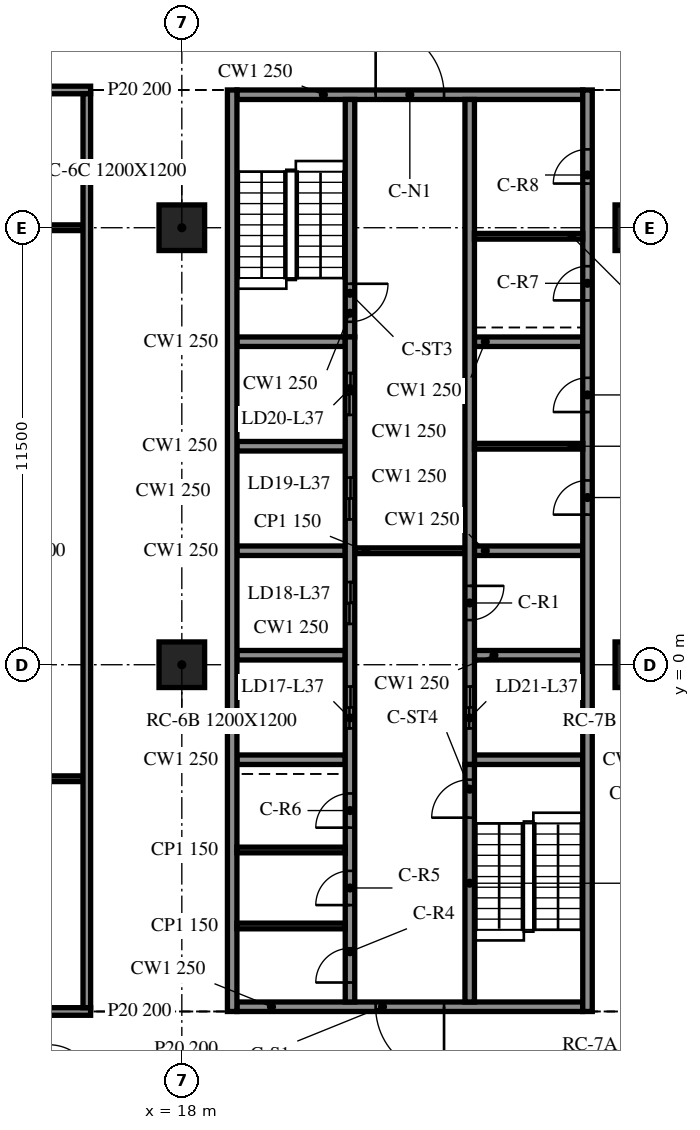
"""IFC4 building model, lengths in metres.
Left out: names, types, materials, properties, quantities, classifications, styles, units other than length and angle.
Written with IfcOpenShell. Run it as: python <this file> out.ifc"""

import sys

from ifc_helpers import new_model, si_unit, direction, frame, frame_2d, origin, origin_2d, place, context, subcontext, project, spatial, rectangle, extrude, element, fill, save


model = new_model("IFC4")
c1 = context("Model", 3, precision=1e-05, world=origin(), true_north=direction((0.0, 1.0)))
c2 = subcontext(c1, "Body", "Model", "MODEL_VIEW")
j1 = project(units=[si_unit("LENGTHUNIT", "METRE"), si_unit("PLANEANGLEUNIT", "RADIAN")], contexts=[c1])
p1 = place(None, origin())
s1 = spatial("IfcSite", under=j1, at=p1, CompositionType="ELEMENT")
p2 = place(p1, origin())
s2 = spatial("IfcBuilding", under=s1, at=p2, CompositionType="ELEMENT")
p3 = place(p2, frame((0.0, 0.0, 159.2)))
s3 = spatial("IfcBuildingStorey", under=s2, at=p3, CompositionType="ELEMENT", Elevation=159.2)
for number, where, z_axis, x_axis in (
    (1, (18.0, 0.0, -0.34), (0.0, 0.0, 1.0), (1.0, 0.0, 0.0)),
    (2, (18.0, 11.5, -0.34), (0.0, 0.0, 1.0), (1.0, 0.0, 0.0)),
    (3, (30.0, 0.0, -0.34), (0.0, 0.0, 1.0), (1.0, 0.0, 0.0)),
    (4, (30.0, 11.5, -0.34), (0.0, 0.0, 1.0), (1.0, 0.0, 0.0)),
):
    element("IfcColumn", number, at=place(p3, frame(where, z_axis=z_axis, x_axis=x_axis)), inside=s3, PredefinedType="COLUMN", context=c2, shape_type="SweptSolid", body=[
        extrude(rectangle(XDim=1.2, YDim=1.2, at=origin_2d()), origin(), (0.0, 0.0, 1.0), 3.8),
    ])
p4 = place(p3, frame((19.325, 15.125, 0.0), z_axis=(0.0, 0.0, 1.0), x_axis=(0.0, -1.0, 0.0)))
e5 = element("IfcWall", 5, at=p4, inside=s3, PredefinedType="SOLIDWALL", context=c2, shape_type="SweptSolid", body=[
    extrude(rectangle(XDim=24.25, YDim=0.25, at=frame_2d((12.125, 0.0))), origin(), (0.0, 0.0, 1.0), 3.46),
])
p5 = place(p3, frame((28.675, -9.125, 0.0), z_axis=(0.0, 0.0, 1.0), x_axis=(0.0, 1.0, 0.0)))
e6 = element("IfcWall", 6, at=p5, inside=s3, PredefinedType="SOLIDWALL", context=c2, shape_type="SweptSolid", body=[
    extrude(rectangle(XDim=24.25, YDim=0.25, at=frame_2d((12.125, 0.0))), origin(), (0.0, 0.0, 1.0), 3.46),
])
p6 = place(p5, frame((13.075, 0.0, 0.0)))
e7 = element("IfcOpeningElement", 7, at=p6, cuts=e6, PredefinedType="OPENING", context=c2, shape_type="SweptSolid", body=[
    extrude(rectangle(XDim=0.9, YDim=2.1, at=frame_2d((0.45, 1.05))), frame((0.0, 0.135, 0.0), z_axis=(0.0, -1.0, 0.0), x_axis=(1.0, 0.0, 0.0)), (0.0, 0.0, 1.0), 0.27),
])
p7 = place(p5, frame((15.775, 0.0, 0.0)))
e8 = element("IfcOpeningElement", 8, at=p7, cuts=e6, PredefinedType="OPENING", context=c2, shape_type="SweptSolid", body=[
    extrude(rectangle(XDim=0.9, YDim=2.1, at=frame_2d((0.45, 1.05))), frame((0.0, 0.135, 0.0), z_axis=(0.0, -1.0, 0.0), x_axis=(1.0, 0.0, 0.0)), (0.0, 0.0, 1.0), 0.27),
])
p8 = place(p5, frame((18.712, 0.0, 0.0)))
e9 = element("IfcOpeningElement", 9, at=p8, cuts=e6, PredefinedType="OPENING", context=c2, shape_type="SweptSolid", body=[
    extrude(rectangle(XDim=0.9, YDim=2.1, at=frame_2d((0.45, 1.05))), frame((0.0, 0.135, 0.0), z_axis=(0.0, -1.0, 0.0), x_axis=(1.0, 0.0, 0.0)), (0.0, 0.0, 1.0), 0.27),
])
p9 = place(p5, frame((21.788, 0.0, 0.0)))
e10 = element("IfcOpeningElement", 10, at=p9, cuts=e6, PredefinedType="OPENING", context=c2, shape_type="SweptSolid", body=[
    extrude(rectangle(XDim=0.9, YDim=2.1, at=frame_2d((0.45, 1.05))), frame((0.0, 0.135, 0.0), z_axis=(0.0, -1.0, 0.0), x_axis=(1.0, 0.0, 0.0)), (0.0, 0.0, 1.0), 0.27),
])
p10 = place(p3, frame((28.55, -9.0, 0.0), z_axis=(0.0, 0.0, 1.0), x_axis=(-1.0, 0.0, 0.0)))
e11 = element("IfcWall", 11, at=p10, inside=s3, PredefinedType="SOLIDWALL", context=c2, shape_type="SweptSolid", body=[
    extrude(rectangle(XDim=9.1, YDim=0.25, at=frame_2d((4.55, 0.0))), origin(), (0.0, 0.0, 1.0), 3.46),
])
p11 = place(p10, frame((3.65, 0.0, 0.0)))
e12 = element("IfcOpeningElement", 12, at=p11, cuts=e11, PredefinedType="OPENING", context=c2, shape_type="SweptSolid", body=[
    extrude(rectangle(XDim=1.8, YDim=2.1, at=frame_2d((0.9, 1.05))), frame((0.0, 0.135, 0.0), z_axis=(0.0, -1.0, 0.0), x_axis=(1.0, 0.0, 0.0)), (0.0, 0.0, 1.0), 0.27),
])
p12 = place(p3, frame((19.45, 15.0, 0.0), z_axis=(0.0, 0.0, 1.0), x_axis=(1.0, 0.0, 0.0)))
e13 = element("IfcWall", 13, at=p12, inside=s3, PredefinedType="SOLIDWALL", context=c2, shape_type="SweptSolid", body=[
    extrude(rectangle(XDim=9.1, YDim=0.25, at=frame_2d((4.55, 0.0))), origin(), (0.0, 0.0, 1.0), 3.46),
])
p13 = place(p12, frame((3.65, 0.0, 0.0)))
e14 = element("IfcOpeningElement", 14, at=p13, cuts=e13, PredefinedType="OPENING", context=c2, shape_type="SweptSolid", body=[
    extrude(rectangle(XDim=1.8, YDim=2.1, at=frame_2d((0.9, 1.05))), frame((0.0, 0.135, 0.0), z_axis=(0.0, -1.0, 0.0), x_axis=(1.0, 0.0, 0.0)), (0.0, 0.0, 1.0), 0.27),
])
p14 = place(p3, frame((22.425, -8.875, 0.0), z_axis=(0.0, 0.0, 1.0), x_axis=(0.0, 1.0, 0.0)))
e15 = element("IfcWall", 15, at=p14, inside=s3, PredefinedType="SOLIDWALL", context=c2, shape_type="SweptSolid", body=[
    extrude(rectangle(XDim=17.5, YDim=0.25, at=frame_2d((8.75, 0.0))), origin(), (0.0, 0.0, 1.0), 3.46),
])
p15 = place(p14, frame((7.2, 0.0, 0.0)))
e16 = element("IfcOpeningElement", 16, at=p15, cuts=e15, PredefinedType="OPENING", context=c2, shape_type="SweptSolid", body=[
    extrude(rectangle(XDim=1.1, YDim=2.1, at=frame_2d((0.55, 1.05))), frame((0.0, 0.135, 0.0), z_axis=(0.0, -1.0, 0.0), x_axis=(1.0, 0.0, 0.0)), (0.0, 0.0, 1.0), 0.27),
])
p16 = place(p14, frame((9.95, 0.0, 0.0)))
e17 = element("IfcOpeningElement", 17, at=p16, cuts=e15, PredefinedType="OPENING", context=c2, shape_type="SweptSolid", body=[
    extrude(rectangle(XDim=1.1, YDim=2.1, at=frame_2d((0.55, 1.05))), frame((0.0, 0.135, 0.0), z_axis=(0.0, -1.0, 0.0), x_axis=(1.0, 0.0, 0.0)), (0.0, 0.0, 1.0), 0.27),
])
p17 = place(p14, frame((12.7, 0.0, 0.0)))
e18 = element("IfcOpeningElement", 18, at=p17, cuts=e15, PredefinedType="OPENING", context=c2, shape_type="SweptSolid", body=[
    extrude(rectangle(XDim=1.1, YDim=2.1, at=frame_2d((0.55, 1.05))), frame((0.0, 0.135, 0.0), z_axis=(0.0, -1.0, 0.0), x_axis=(1.0, 0.0, 0.0)), (0.0, 0.0, 1.0), 0.27),
])
p18 = place(p14, frame((15.45, 0.0, 0.0)))
e19 = element("IfcOpeningElement", 19, at=p18, cuts=e15, PredefinedType="OPENING", context=c2, shape_type="SweptSolid", body=[
    extrude(rectangle(XDim=1.1, YDim=2.1, at=frame_2d((0.55, 1.05))), frame((0.0, 0.135, 0.0), z_axis=(0.0, -1.0, 0.0), x_axis=(1.0, 0.0, 0.0)), (0.0, 0.0, 1.0), 0.27),
])
p19 = place(p14, frame((0.512, 0.0, 0.0)))
e20 = element("IfcOpeningElement", 20, at=p19, cuts=e15, PredefinedType="OPENING", context=c2, shape_type="SweptSolid", body=[
    extrude(rectangle(XDim=0.9, YDim=2.1, at=frame_2d((0.45, 1.05))), frame((0.0, 0.135, 0.0), z_axis=(0.0, -1.0, 0.0), x_axis=(1.0, 0.0, 0.0)), (0.0, 0.0, 1.0), 0.27),
])
p20 = place(p14, frame((2.55, 0.0, 0.0)))
e21 = element("IfcOpeningElement", 21, at=p20, cuts=e15, PredefinedType="OPENING", context=c2, shape_type="SweptSolid", body=[
    extrude(rectangle(XDim=0.9, YDim=2.1, at=frame_2d((0.45, 1.05))), frame((0.0, 0.135, 0.0), z_axis=(0.0, -1.0, 0.0), x_axis=(1.0, 0.0, 0.0)), (0.0, 0.0, 1.0), 0.27),
])
p21 = place(p14, frame((4.587, 0.0, 0.0)))
e22 = element("IfcOpeningElement", 22, at=p21, cuts=e15, PredefinedType="OPENING", context=c2, shape_type="SweptSolid", body=[
    extrude(rectangle(XDim=0.9, YDim=2.1, at=frame_2d((0.45, 1.05))), frame((0.0, 0.135, 0.0), z_axis=(0.0, -1.0, 0.0), x_axis=(1.0, 0.0, 0.0)), (0.0, 0.0, 1.0), 0.27),
])
p22 = place(p3, frame((22.425, 14.875, 0.0), z_axis=(0.0, 0.0, 1.0), x_axis=(0.0, -1.0, 0.0)))
e23 = element("IfcWall", 23, at=p22, inside=s3, PredefinedType="SOLIDWALL", context=c2, shape_type="SweptSolid", body=[
    extrude(rectangle(XDim=6.25, YDim=0.25, at=frame_2d((3.125, 0.0))), origin(), (0.0, 0.0, 1.0), 3.46),
])
p23 = place(p22, frame((4.85, 0.0, 0.0)))
e24 = element("IfcOpeningElement", 24, at=p23, cuts=e23, PredefinedType="OPENING", context=c2, shape_type="SweptSolid", body=[
    extrude(rectangle(XDim=1.0, YDim=2.1, at=frame_2d((0.5, 1.05))), frame((0.0, 0.135, 0.0), z_axis=(0.0, -1.0, 0.0), x_axis=(1.0, 0.0, 0.0)), (0.0, 0.0, 1.0), 0.27),
])
p24 = place(p3, frame((25.575, -8.875, 0.0), z_axis=(0.0, 0.0, 1.0), x_axis=(0.0, 1.0, 0.0)))
e25 = element("IfcWall", 25, at=p24, inside=s3, PredefinedType="SOLIDWALL", context=c2, shape_type="SweptSolid", body=[
    extrude(rectangle(XDim=6.25, YDim=0.25, at=frame_2d((3.125, 0.0))), origin(), (0.0, 0.0, 1.0), 3.46),
])
p25 = place(p24, frame((4.85, 0.0, 0.0)))
e26 = element("IfcOpeningElement", 26, at=p25, cuts=e25, PredefinedType="OPENING", context=c2, shape_type="SweptSolid", body=[
    extrude(rectangle(XDim=1.0, YDim=2.1, at=frame_2d((0.5, 1.05))), frame((0.0, 0.135, 0.0), z_axis=(0.0, -1.0, 0.0), x_axis=(1.0, 0.0, 0.0)), (0.0, 0.0, 1.0), 0.27),
])
p26 = place(p3, frame((25.575, 14.875, 0.0), z_axis=(0.0, 0.0, 1.0), x_axis=(0.0, -1.0, 0.0)))
e27 = element("IfcWall", 27, at=p26, inside=s3, PredefinedType="SOLIDWALL", context=c2, shape_type="SweptSolid", body=[
    extrude(rectangle(XDim=17.5, YDim=0.25, at=frame_2d((8.75, 0.0))), origin(), (0.0, 0.0, 1.0), 3.46),
])
p27 = place(p26, frame((15.45, 0.0, 0.0)))
e28 = element("IfcOpeningElement", 28, at=p27, cuts=e27, PredefinedType="OPENING", context=c2, shape_type="SweptSolid", body=[
    extrude(rectangle(XDim=1.1, YDim=2.1, at=frame_2d((0.55, 1.05))), frame((0.0, 0.135, 0.0), z_axis=(0.0, -1.0, 0.0), x_axis=(1.0, 0.0, 0.0)), (0.0, 0.0, 1.0), 0.27),
])
p28 = place(p26, frame((12.8, 0.0, 0.0)))
e29 = element("IfcOpeningElement", 29, at=p28, cuts=e27, PredefinedType="OPENING", context=c2, shape_type="SweptSolid", body=[
    extrude(rectangle(XDim=0.9, YDim=2.1, at=frame_2d((0.45, 1.05))), frame((0.0, 0.135, 0.0), z_axis=(0.0, -1.0, 0.0), x_axis=(1.0, 0.0, 0.0)), (0.0, 0.0, 1.0), 0.27),
])
for number, where, z_axis, x_axis in (
    (30, (19.45, -2.5, 0.0), (0.0, 0.0, 1.0), (1.0, 0.0, 0.0)),
    (31, (19.45, 0.25, 0.0), (0.0, 0.0, 1.0), (1.0, 0.0, 0.0)),
    (32, (19.45, 3.0, 0.0), (0.0, 0.0, 1.0), (1.0, 0.0, 0.0)),
    (33, (19.45, 5.75, 0.0), (0.0, 0.0, 1.0), (1.0, 0.0, 0.0)),
    (34, (19.45, 8.5, 0.0), (0.0, 0.0, 1.0), (1.0, 0.0, 0.0)),
    (35, (25.7, -2.5, 0.0), (0.0, 0.0, 1.0), (1.0, 0.0, 0.0)),
    (36, (25.7, 0.25, 0.0), (0.0, 0.0, 1.0), (1.0, 0.0, 0.0)),
    (37, (25.7, 3.0, 0.0), (0.0, 0.0, 1.0), (1.0, 0.0, 0.0)),
    (38, (25.7, 8.5, 0.0), (0.0, 0.0, 1.0), (1.0, 0.0, 0.0)),
):
    element("IfcWall", number, at=place(p3, frame(where, z_axis=z_axis, x_axis=x_axis)), inside=s3, PredefinedType="SOLIDWALL", context=c2, shape_type="SweptSolid", body=[
        extrude(rectangle(XDim=2.85, YDim=0.25, at=frame_2d((1.425, 0.0))), origin(), (0.0, 0.0, 1.0), 3.46),
    ])
p29 = place(p3, frame((22.55, 3.0, 0.0), z_axis=(0.0, 0.0, 1.0), x_axis=(1.0, 0.0, 0.0)))
e39 = element("IfcWall", 39, at=p29, inside=s3, PredefinedType="PARTITIONING", context=c2, shape_type="SweptSolid", body=[
    extrude(rectangle(XDim=2.9, YDim=0.15, at=frame_2d((1.45, 0.0))), origin(), (0.0, 0.0, 1.0), 3.46),
])
for number, where, z_axis, x_axis in (
    (40, (25.7, 5.75, 0.0), (0.0, 0.0, 1.0), (1.0, 0.0, 0.0)),
    (41, (19.45, -6.875, 0.0), (0.0, 0.0, 1.0), (1.0, 0.0, 0.0)),
    (42, (19.45, -4.875, 0.0), (0.0, 0.0, 1.0), (1.0, 0.0, 0.0)),
    (43, (25.7, 11.275, 0.0), (0.0, 0.0, 1.0), (1.0, 0.0, 0.0)),
):
    element("IfcWall", number, at=place(p3, frame(where, z_axis=z_axis, x_axis=x_axis)), inside=s3, PredefinedType="PARTITIONING", context=c2, shape_type="SweptSolid", body=[
        extrude(rectangle(XDim=2.85, YDim=0.15, at=frame_2d((1.425, 0.0))), origin(), (0.0, 0.0, 1.0), 3.46),
    ])
p30 = place(p3, frame((8.3, -9.125, 0.0), z_axis=(0.0, 0.0, 1.0), x_axis=(1.0, 0.0, 0.0)))
e44 = element("IfcWall", 44, at=p30, inside=s3, PredefinedType="PARTITIONING", context=c2, shape_type="SweptSolid", body=[
    extrude(rectangle(XDim=7.3, YDim=0.2, at=frame_2d((3.65, 0.0))), origin(), (0.0, 0.0, 1.0), 3.46),
])
p31 = place(p30, frame((3.1, 0.0, 0.0)))
e45 = element("IfcOpeningElement", 45, at=p31, cuts=e44, PredefinedType="OPENING", context=c2, shape_type="SweptSolid", body=[
    extrude(rectangle(XDim=0.9, YDim=2.1, at=frame_2d((0.45, 1.05))), frame((0.0, 0.11, 0.0), z_axis=(0.0, -1.0, 0.0), x_axis=(1.0, 0.0, 0.0)), (0.0, 0.0, 1.0), 0.22),
])
for number, where, z_axis, x_axis in (
    (46, (8.5, -3.0, 0.0), (0.0, 0.0, 1.0), (1.0, 0.0, 0.0)),
    (47, (8.5, 11.5, 0.0), (0.0, 0.0, 1.0), (1.0, 0.0, 0.0)),
):
    element("IfcWall", number, at=place(p3, frame(where, z_axis=z_axis, x_axis=x_axis)), inside=s3, PredefinedType="PARTITIONING", context=c2, shape_type="SweptSolid", body=[
        extrude(rectangle(XDim=6.9, YDim=0.15, at=frame_2d((3.45, 0.0))), origin(), (0.0, 0.0, 1.0), 3.46),
    ])
p32 = place(p3, frame((8.3, 15.125, 0.0), z_axis=(0.0, 0.0, 1.0), x_axis=(1.0, 0.0, 0.0)))
e48 = element("IfcWall", 48, at=p32, inside=s3, PredefinedType="PARTITIONING", context=c2, shape_type="SweptSolid", body=[
    extrude(rectangle(XDim=7.3, YDim=0.2, at=frame_2d((3.65, 0.0))), origin(), (0.0, 0.0, 1.0), 3.46),
])
p33 = place(p32, frame((3.1, 0.0, 0.0)))
e49 = element("IfcOpeningElement", 49, at=p33, cuts=e48, PredefinedType="OPENING", context=c2, shape_type="SweptSolid", body=[
    extrude(rectangle(XDim=1.0, YDim=2.1, at=frame_2d((0.5, 1.05))), frame((0.0, 0.11, 0.0), z_axis=(0.0, -1.0, 0.0), x_axis=(1.0, 0.0, 0.0)), (0.0, 0.0, 1.0), 0.22),
])
p34 = place(p3, frame((15.5, -9.025, 0.0), z_axis=(0.0, 0.0, 1.0), x_axis=(0.0, 1.0, 0.0)))
e50 = element("IfcWall", 50, at=p34, inside=s3, PredefinedType="PARTITIONING", context=c2, shape_type="SweptSolid", body=[
    extrude(rectangle(XDim=24.05, YDim=0.2, at=frame_2d((12.025, 0.0))), origin(), (0.0, 0.0, 1.0), 3.46),
])
p35 = place(p11, origin())
e51 = element("IfcDoor", 51, at=p35, inside=s3, OperationType="DOUBLE_DOOR_SINGLE_SWING", PredefinedType="DOOR", context=c2, shape_type="SweptSolid", body=[
    extrude(rectangle(XDim=1.8, YDim=2.1, at=frame_2d((0.9, 1.05))), frame((0.0, 0.025, 0.0), z_axis=(0.0, -1.0, 0.0), x_axis=(1.0, 0.0, 0.0)), (0.0, 0.0, 1.0), 0.05),
])
fill(e12, e51)
p36 = place(p13, origin())
e52 = element("IfcDoor", 52, at=p36, inside=s3, OperationType="DOUBLE_DOOR_SINGLE_SWING", PredefinedType="DOOR", context=c2, shape_type="SweptSolid", body=[
    extrude(rectangle(XDim=1.8, YDim=2.1, at=frame_2d((0.9, 1.05))), frame((0.0, 0.025, 0.0), z_axis=(0.0, -1.0, 0.0), x_axis=(1.0, 0.0, 0.0)), (0.0, 0.0, 1.0), 0.05),
])
fill(e14, e52)
p37 = place(p27, origin())
e53 = element("IfcDoor", 53, at=p37, inside=s3, OperationType="DOUBLE_DOOR_SLIDING", PredefinedType="DOOR", context=c2, shape_type="SweptSolid", body=[
    extrude(rectangle(XDim=1.1, YDim=2.1, at=frame_2d((0.55, 1.05))), frame((0.0, 0.025, 0.0), z_axis=(0.0, -1.0, 0.0), x_axis=(1.0, 0.0, 0.0)), (0.0, 0.0, 1.0), 0.05),
])
fill(e28, e53)
p38 = place(p15, origin())
e54 = element("IfcDoor", 54, at=p38, inside=s3, OperationType="DOUBLE_DOOR_SLIDING", PredefinedType="DOOR", context=c2, shape_type="SweptSolid", body=[
    extrude(rectangle(XDim=1.1, YDim=2.1, at=frame_2d((0.55, 1.05))), frame((0.0, 0.025, 0.0), z_axis=(0.0, -1.0, 0.0), x_axis=(1.0, 0.0, 0.0)), (0.0, 0.0, 1.0), 0.05),
])
fill(e16, e54)
p39 = place(p16, origin())
e55 = element("IfcDoor", 55, at=p39, inside=s3, OperationType="DOUBLE_DOOR_SLIDING", PredefinedType="DOOR", context=c2, shape_type="SweptSolid", body=[
    extrude(rectangle(XDim=1.1, YDim=2.1, at=frame_2d((0.55, 1.05))), frame((0.0, 0.025, 0.0), z_axis=(0.0, -1.0, 0.0), x_axis=(1.0, 0.0, 0.0)), (0.0, 0.0, 1.0), 0.05),
])
fill(e17, e55)
p40 = place(p17, origin())
e56 = element("IfcDoor", 56, at=p40, inside=s3, OperationType="DOUBLE_DOOR_SLIDING", PredefinedType="DOOR", context=c2, shape_type="SweptSolid", body=[
    extrude(rectangle(XDim=1.1, YDim=2.1, at=frame_2d((0.55, 1.05))), frame((0.0, 0.025, 0.0), z_axis=(0.0, -1.0, 0.0), x_axis=(1.0, 0.0, 0.0)), (0.0, 0.0, 1.0), 0.05),
])
fill(e18, e56)
p41 = place(p18, origin())
e57 = element("IfcDoor", 57, at=p41, inside=s3, OperationType="DOUBLE_DOOR_SLIDING", PredefinedType="DOOR", context=c2, shape_type="SweptSolid", body=[
    extrude(rectangle(XDim=1.1, YDim=2.1, at=frame_2d((0.55, 1.05))), frame((0.0, 0.025, 0.0), z_axis=(0.0, -1.0, 0.0), x_axis=(1.0, 0.0, 0.0)), (0.0, 0.0, 1.0), 0.05),
])
fill(e19, e57)
p42 = place(p28, origin())
e58 = element("IfcDoor", 58, at=p42, inside=s3, OperationType="SINGLE_SWING_LEFT", PredefinedType="DOOR", context=c2, shape_type="SweptSolid", body=[
    extrude(rectangle(XDim=0.9, YDim=2.1, at=frame_2d((0.45, 1.05))), frame((0.0, 0.025, 0.0), z_axis=(0.0, -1.0, 0.0), x_axis=(1.0, 0.0, 0.0)), (0.0, 0.0, 1.0), 0.05),
])
fill(e29, e58)
p43 = place(p6, origin())
e59 = element("IfcDoor", 59, at=p43, inside=s3, OperationType="SINGLE_SWING_RIGHT", PredefinedType="DOOR", context=c2, shape_type="SweptSolid", body=[
    extrude(rectangle(XDim=0.9, YDim=2.1, at=frame_2d((0.45, 1.05))), frame((0.0, 0.025, 0.0), z_axis=(0.0, -1.0, 0.0), x_axis=(1.0, 0.0, 0.0)), (0.0, 0.0, 1.0), 0.05),
])
fill(e7, e59)
p44 = place(p7, origin())
e60 = element("IfcDoor", 60, at=p44, inside=s3, OperationType="SINGLE_SWING_LEFT", PredefinedType="DOOR", context=c2, shape_type="SweptSolid", body=[
    extrude(rectangle(XDim=0.9, YDim=2.1, at=frame_2d((0.45, 1.05))), frame((0.0, 0.025, 0.0), z_axis=(0.0, -1.0, 0.0), x_axis=(1.0, 0.0, 0.0)), (0.0, 0.0, 1.0), 0.05),
])
fill(e8, e60)
p45 = place(p19, origin())
e61 = element("IfcDoor", 61, at=p45, inside=s3, OperationType="SINGLE_SWING_RIGHT", PredefinedType="DOOR", context=c2, shape_type="SweptSolid", body=[
    extrude(rectangle(XDim=0.9, YDim=2.1, at=frame_2d((0.45, 1.05))), frame((0.0, 0.025, 0.0), z_axis=(0.0, -1.0, 0.0), x_axis=(1.0, 0.0, 0.0)), (0.0, 0.0, 1.0), 0.05),
])
fill(e20, e61)
p46 = place(p20, origin())
e62 = element("IfcDoor", 62, at=p46, inside=s3, OperationType="SINGLE_SWING_LEFT", PredefinedType="DOOR", context=c2, shape_type="SweptSolid", body=[
    extrude(rectangle(XDim=0.9, YDim=2.1, at=frame_2d((0.45, 1.05))), frame((0.0, 0.025, 0.0), z_axis=(0.0, -1.0, 0.0), x_axis=(1.0, 0.0, 0.0)), (0.0, 0.0, 1.0), 0.05),
])
fill(e21, e62)
p47 = place(p21, origin())
e63 = element("IfcDoor", 63, at=p47, inside=s3, OperationType="SINGLE_SWING_RIGHT", PredefinedType="DOOR", context=c2, shape_type="SweptSolid", body=[
    extrude(rectangle(XDim=0.9, YDim=2.1, at=frame_2d((0.45, 1.05))), frame((0.0, 0.025, 0.0), z_axis=(0.0, -1.0, 0.0), x_axis=(1.0, 0.0, 0.0)), (0.0, 0.0, 1.0), 0.05),
])
fill(e22, e63)
p48 = place(p8, origin())
e64 = element("IfcDoor", 64, at=p48, inside=s3, OperationType="SINGLE_SWING_LEFT", PredefinedType="DOOR", context=c2, shape_type="SweptSolid", body=[
    extrude(rectangle(XDim=0.9, YDim=2.1, at=frame_2d((0.45, 1.05))), frame((0.0, 0.025, 0.0), z_axis=(0.0, -1.0, 0.0), x_axis=(1.0, 0.0, 0.0)), (0.0, 0.0, 1.0), 0.05),
])
fill(e9, e64)
p49 = place(p9, origin())
e65 = element("IfcDoor", 65, at=p49, inside=s3, OperationType="SINGLE_SWING_RIGHT", PredefinedType="DOOR", context=c2, shape_type="SweptSolid", body=[
    extrude(rectangle(XDim=0.9, YDim=2.1, at=frame_2d((0.45, 1.05))), frame((0.0, 0.025, 0.0), z_axis=(0.0, -1.0, 0.0), x_axis=(1.0, 0.0, 0.0)), (0.0, 0.0, 1.0), 0.05),
])
fill(e10, e65)
p50 = place(p23, origin())
e66 = element("IfcDoor", 66, at=p50, inside=s3, OperationType="SINGLE_SWING_LEFT", PredefinedType="DOOR", context=c2, shape_type="SweptSolid", body=[
    extrude(rectangle(XDim=1.0, YDim=2.1, at=frame_2d((0.5, 1.05))), frame((0.0, 0.025, 0.0), z_axis=(0.0, -1.0, 0.0), x_axis=(1.0, 0.0, 0.0)), (0.0, 0.0, 1.0), 0.05),
])
fill(e24, e66)
p51 = place(p25, origin())
e67 = element("IfcDoor", 67, at=p51, inside=s3, OperationType="SINGLE_SWING_RIGHT", PredefinedType="DOOR", context=c2, shape_type="SweptSolid", body=[
    extrude(rectangle(XDim=1.0, YDim=2.1, at=frame_2d((0.5, 1.05))), frame((0.0, 0.025, 0.0), z_axis=(0.0, -1.0, 0.0), x_axis=(1.0, 0.0, 0.0)), (0.0, 0.0, 1.0), 0.05),
])
fill(e26, e67)
save(model, sys.argv[1])
